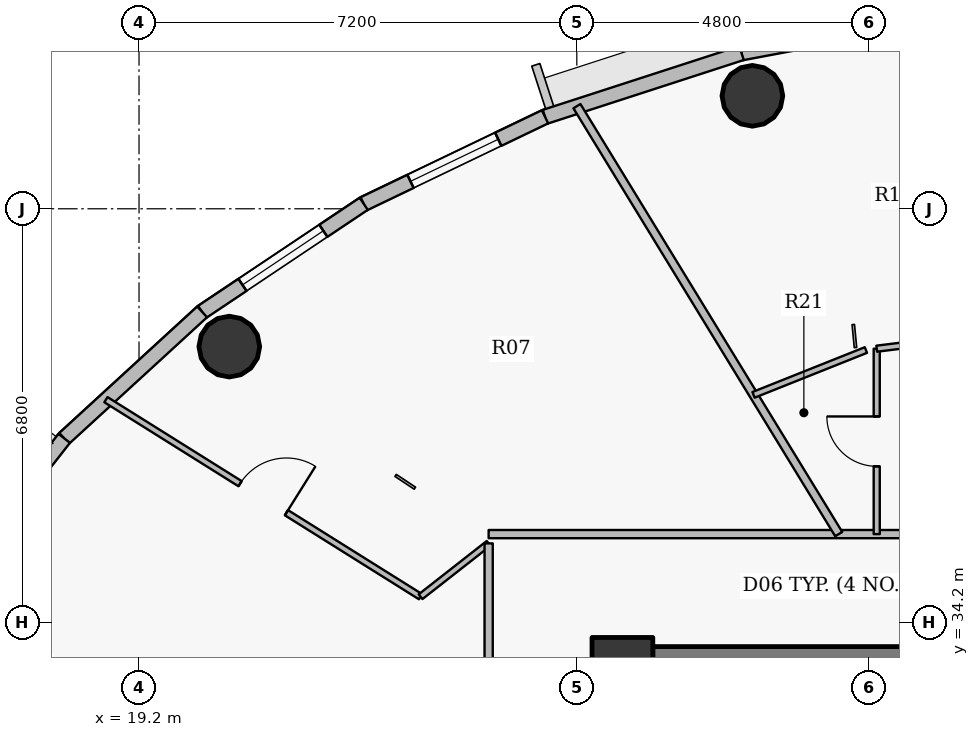
"""IFC4 building model, lengths in metres.
Left out: names, types, materials, properties, quantities, classifications, styles, units other than length and angle.
Written with IfcOpenShell. Run it as: python <this file> out.ifc"""

import sys

from ifc_helpers import new_model, si_unit, direction, frame, frame_2d, origin, origin_2d, place, context, subcontext, project, spatial, rectangle, hollow_circle, extrude, source, transform, mapped, element, fill, save


model = new_model("IFC4")
c1 = context("Model", 3, precision=1e-05, world=origin(), true_north=direction((0.0, 1.0)))
c2 = subcontext(c1, "Body", "Model", "MODEL_VIEW")
j1 = project(units=[si_unit("LENGTHUNIT", "METRE"), si_unit("PLANEANGLEUNIT", "RADIAN")], contexts=[c1])
p1 = place(None, origin())
s1 = spatial("IfcSite", under=j1, at=p1, CompositionType="ELEMENT")
p2 = place(p1, origin())
s2 = spatial("IfcBuilding", under=s1, at=p2, CompositionType="ELEMENT")
p3 = place(p2, frame((0.0, 0.0, 291.75)))
s3 = spatial("IfcBuildingStorey", under=s2, at=p3, CompositionType="ELEMENT", Elevation=291.75)
p4 = place(p3, frame((27.15, 33.45, 0.0), z_axis=(0.0, 0.0, 1.0), x_axis=(1.0, 0.0, 0.0)))
e1 = element("IfcColumn", 1, at=p4, inside=s3, PredefinedType="COLUMN", context=c2, shape_type="SweptSolid", body=[
    extrude(rectangle(XDim=1.0, YDim=1.0, at=origin_2d()), origin(), (0.0, 0.0, 1.0), 3.75),
])
p5 = place(p3, frame((27.65, 33.45, 0.0), z_axis=(0.0, 0.0, 1.0), x_axis=(1.0, 0.0, 0.0)))
e2 = element("IfcWall", 2, at=p5, inside=s3, PredefinedType="SHEAR", context=c2, shape_type="SweptSolid", body=[
    extrude(rectangle(XDim=16.7, YDim=0.7, at=frame_2d((8.35, 0.0))), origin(), (0.0, 0.0, 1.0), 3.05),
])
p6 = place(p5, frame((12.775, 0.0, 0.0)))
e3 = element("IfcOpeningElement", 3, at=p6, cuts=e2, PredefinedType="OPENING", context=c2, shape_type="SweptSolid", body=[
    extrude(rectangle(XDim=1.15, YDim=2.15, at=origin_2d()), frame((0.575, 0.36, 1.075), z_axis=(0.0, -1.0, 0.0), x_axis=(1.0, 0.0, 0.0)), (0.0, 0.0, 1.0), 0.72),
])
for number, where, z_axis, x_axis in (
    (4, (29.288, 42.858, 0.0), (0.0, 0.0, 1.0), (1.0, 0.0, 0.0)),
    (5, (20.685, 38.733, 0.0), (0.0, 0.0, 1.0), (1.0, 0.0, 0.0)),
):
    element("IfcColumn", number, at=place(p3, frame(where, z_axis=z_axis, x_axis=x_axis)), inside=s3, PredefinedType="COLUMN", context=c2, shape_type="SweptSolid", body=[
        extrude(hollow_circle(Radius=0.5, WallThickness=0.032, at=origin_2d()), origin(), (0.0, 0.0, 1.0), 3.75),
    ])
p7 = place(p3, frame((29.109, 43.56, 0.0), z_axis=(0.0, 0.0, 1.0), x_axis=(0.982782655757, 0.184765395959, 0.0)))
e6 = element("IfcWall", 6, at=p7, inside=s3, PredefinedType="SOLIDWALL", context=c2, shape_type="SweptSolid", body=[
    extrude(rectangle(XDim=3.462, YDim=0.24, at=frame_2d((1.731, 0.0))), origin(), (0.0, 0.0, 1.0), 3.5),
])
p8 = place(p7, frame((1.106, 0.0, 0.9)))
e7 = element("IfcOpeningElement", 7, at=p8, cuts=e6, PredefinedType="OPENING", context=c2, shape_type="SweptSolid", body=[
    extrude(rectangle(XDim=1.25, YDim=1.65, at=origin_2d()), frame((0.625, 0.13, 0.825), z_axis=(0.0, -1.0, 0.0), x_axis=(1.0, 0.0, 0.0)), (0.0, 0.0, 1.0), 0.26),
])
p9 = place(p3, frame((25.877, 42.512, 0.0), z_axis=(0.0, 0.0, 1.0), x_axis=(0.95123136723, 0.308478339592, 0.0)))
e8 = element("IfcWall", 8, at=p9, inside=s3, PredefinedType="SOLIDWALL", context=c2, shape_type="SweptSolid", body=[
    extrude(rectangle(XDim=3.398, YDim=0.24, at=frame_2d((1.699, 0.0))), origin(), (0.0, 0.0, 1.0), 3.5),
])
p10 = place(p3, frame((22.896, 41.082, 0.0), z_axis=(0.0, 0.0, 1.0), x_axis=(0.901573741254, 0.43262546051, 0.0)))
e9 = element("IfcWall", 9, at=p10, inside=s3, PredefinedType="SOLIDWALL", context=c2, shape_type="SweptSolid", body=[
    extrude(rectangle(XDim=3.307, YDim=0.24, at=frame_2d((1.653, 0.0))), origin(), (0.0, 0.0, 1.0), 3.5),
])
p11 = place(p10, frame((0.854, 0.0, 0.9)))
e10 = element("IfcOpeningElement", 10, at=p11, cuts=e9, PredefinedType="OPENING", context=c2, shape_type="SweptSolid", body=[
    extrude(rectangle(XDim=1.6, YDim=1.75, at=origin_2d()), frame((0.8, 0.13, 0.875), z_axis=(0.0, -1.0, 0.0), x_axis=(1.0, 0.0, 0.0)), (0.0, 0.0, 1.0), 0.26),
])
p12 = place(p3, frame((20.238, 39.304, 0.0), z_axis=(0.0, 0.0, 1.0), x_axis=(0.831250592635, 0.55589787933, 0.0)))
e11 = element("IfcWall", 11, at=p12, inside=s3, PredefinedType="SOLIDWALL", context=c2, shape_type="SweptSolid", body=[
    extrude(rectangle(XDim=3.197, YDim=0.24, at=frame_2d((1.599, 0.0))), origin(), (0.0, 0.0, 1.0), 3.5),
])
p13 = place(p12, frame((0.799, 0.0, 0.9)))
e12 = element("IfcOpeningElement", 12, at=p13, cuts=e11, PredefinedType="OPENING", context=c2, shape_type="SweptSolid", body=[
    extrude(rectangle(XDim=1.6, YDim=1.75, at=origin_2d()), frame((0.8, 0.13, 0.875), z_axis=(0.0, -1.0, 0.0), x_axis=(1.0, 0.0, 0.0)), (0.0, 0.0, 1.0), 0.26),
])
p14 = place(p3, frame((17.97, 37.225, 0.0), z_axis=(0.0, 0.0, 1.0), x_axis=(0.737068506972, 0.675818034703, 0.0)))
e13 = element("IfcWall", 13, at=p14, inside=s3, PredefinedType="SOLIDWALL", context=c2, shape_type="SweptSolid", body=[
    extrude(rectangle(XDim=3.077, YDim=0.24, at=frame_2d((1.539, 0.0))), origin(), (0.0, 0.0, 1.0), 3.5),
])
p15 = place(p3, frame((16.146, 34.895, 0.0), z_axis=(0.0, 0.0, 1.0), x_axis=(0.616337186556, 0.787482363275, 0.0)))
e14 = element("IfcWall", 14, at=p15, inside=s3, PredefinedType="SOLIDWALL", context=c2, shape_type="SweptSolid", body=[
    extrude(rectangle(XDim=2.958, YDim=0.24, at=frame_2d((1.479, 0.0))), origin(), (0.0, 0.0, 1.0), 3.5),
])
p16 = place(p15, frame((0.954, 0.0, 0.0)))
e15 = element("IfcOpeningElement", 15, at=p16, cuts=e14, PredefinedType="OPENING", context=c2, shape_type="SweptSolid", body=[
    extrude(rectangle(XDim=1.05, YDim=2.15, at=origin_2d()), frame((0.525, 0.13, 1.075), z_axis=(0.0, -1.0, 0.0), x_axis=(1.0, 0.0, 0.0)), (0.0, 0.0, 1.0), 0.26),
])
p17 = place(p3, frame((18.656, 37.861, 0.0), z_axis=(0.0, 0.0, 1.0), x_axis=(0.847553170054, -0.530710489751, 0.0)))
e16 = element("IfcWall", 16, at=p17, inside=s3, PredefinedType="PARTITIONING", context=c2, shape_type="SweptSolid", body=[
    extrude(rectangle(XDim=6.105, YDim=0.1, at=frame_2d((3.052, 0.0))), origin(), (0.0, 0.0, 1.0), 2.985),
])
p18 = place(p17, frame((2.603, 0.0, 0.0)))
e17 = element("IfcOpeningElement", 17, at=p18, cuts=e16, PredefinedType="OPENING", context=c2, shape_type="SweptSolid", body=[
    extrude(rectangle(XDim=0.9, YDim=2.1, at=origin_2d()), frame((0.45, 0.06, 1.05), z_axis=(0.0, -1.0, 0.0), x_axis=(1.0, 0.0, 0.0)), (0.0, 0.0, 1.0), 0.12),
])
p19 = place(p3, frame((23.83, 34.621, 0.0), z_axis=(0.0, 0.0, 1.0), x_axis=(0.787407186809, 0.616433226037, 0.0)))
e18 = element("IfcWall", 18, at=p19, inside=s3, PredefinedType="PARTITIONING", context=c2, shape_type="SweptSolid", body=[
    extrude(rectangle(XDim=1.422, YDim=0.1, at=frame_2d((0.711, 0.0))), origin(), (0.0, 0.0, 1.0), 3.035),
])
p20 = place(p3, frame((24.95, 31.65, 0.0), z_axis=(0.0, 0.0, 1.0), x_axis=(0.0, 1.0, 0.0)))
e19 = element("IfcWall", 19, at=p20, inside=s3, PredefinedType="PARTITIONING", context=c2, shape_type="SweptSolid", body=[
    extrude(rectangle(XDim=3.847, YDim=0.135, at=frame_2d((1.924, 0.0))), origin(), (0.0, 0.0, 1.0), 3.035),
])
p21 = place(p3, frame((24.95, 35.65, 0.0), z_axis=(0.0, 0.0, 1.0), x_axis=(1.0, 0.0, 0.0)))
e20 = element("IfcWall", 20, at=p21, inside=s3, PredefinedType="PARTITIONING", context=c2, shape_type="SweptSolid", body=[
    extrude(rectangle(XDim=10.1, YDim=0.135, at=frame_2d((5.05, 0.0))), origin(), (0.0, 0.0, 1.0), 3.035),
])
p22 = place(p3, frame((26.402, 42.688, 0.0), z_axis=(0.0, 0.0, 1.0), x_axis=(0.521891606098, -0.853011812043, 0.0)))
e21 = element("IfcWall", 21, at=p22, inside=s3, PredefinedType="PARTITIONING", context=c2, shape_type="SweptSolid", body=[
    extrude(rectangle(XDim=8.25, YDim=0.135, at=frame_2d((4.125, 0.0))), origin(), (0.0, 0.0, 1.0), 2.985),
])
p23 = place(p3, frame((29.307, 37.94, 0.0), z_axis=(0.0, 0.0, 1.0), x_axis=(0.928797929692, 0.370586569913, 0.0)))
e22 = element("IfcWall", 22, at=p23, inside=s3, PredefinedType="PARTITIONING", context=c2, shape_type="SweptSolid", body=[
    extrude(rectangle(XDim=1.99, YDim=0.1, at=frame_2d((0.995, 0.0))), origin(), (0.0, 0.0, 1.0), 3.035),
])
p24 = place(p3, frame((31.333, 35.65, 0.0), z_axis=(0.0, 0.0, 1.0), x_axis=(0.0, 1.0, 0.0)))
e23 = element("IfcWall", 23, at=p24, inside=s3, PredefinedType="PARTITIONING", context=c2, shape_type="SweptSolid", body=[
    extrude(rectangle(XDim=3.049, YDim=0.1, at=frame_2d((1.525, 0.0))), origin(), (0.0, 0.0, 1.0), 3.035),
])
p25 = place(p24, frame((1.115, 0.0, 0.0)))
e24 = element("IfcOpeningElement", 24, at=p25, cuts=e23, PredefinedType="OPENING", context=c2, shape_type="SweptSolid", body=[
    extrude(rectangle(XDim=0.82, YDim=2.1, at=origin_2d()), frame((0.41, 0.06, 1.05), z_axis=(0.0, -1.0, 0.0), x_axis=(1.0, 0.0, 0.0)), (0.0, 0.0, 1.0), 0.12),
])
p26 = place(p3, frame((31.333, 38.699, 0.0), z_axis=(0.0, 0.0, 1.0), x_axis=(0.992398193069, 0.123068380965, 0.0)))
e25 = element("IfcWall", 25, at=p26, inside=s3, PredefinedType="PARTITIONING", context=c2, shape_type="SweptSolid", body=[
    extrude(rectangle(XDim=3.638, YDim=0.1, at=frame_2d((1.819, 0.0))), origin(), (0.0, 0.0, 1.0), 3.185),
])
p27 = place(p3, frame((27.64, 33.8, 0.0), z_axis=(0.0, 0.0, 1.0), x_axis=(-1.0, 0.0, 0.0)))
e26 = element("IfcWall", 26, at=p27, inside=s3, PredefinedType="PARTITIONING", context=c2, shape_type="SweptSolid", body=[
    extrude(rectangle(XDim=0.84, YDim=0.135, at=frame_2d((0.42, 0.0))), origin(), (0.0, 0.0, 1.0), 3.035),
])
m1 = source(origin(), c2, "Body", "SweptSolid", [
    extrude(rectangle(XDim=1.6, YDim=1.75, at=origin_2d()), frame((0.8, 0.03, 0.875), z_axis=(0.0, -1.0, 0.0), x_axis=(1.0, 0.0, 0.0)), (0.0, 0.0, 1.0), 0.06),
])
p28 = place(p11, origin())
e27 = element("IfcWindow", 27, at=p28, inside=s3, PartitioningType="DOUBLE_PANEL_VERTICAL", PredefinedType="WINDOW", context=c2, shape_type="MappedRepresentation", body=[
    mapped(m1, transform((0.0, 0.0, 0.0), x_axis=(1.0, 0.0, 0.0), y_axis=(0.0, 1.0, 0.0), z_axis=(0.0, 0.0, 1.0), scale=1.0)),
])
fill(e10, e27)
p29 = place(p13, origin())
e28 = element("IfcWindow", 28, at=p29, inside=s3, PartitioningType="DOUBLE_PANEL_VERTICAL", PredefinedType="WINDOW", context=c2, shape_type="MappedRepresentation", body=[
    mapped(m1, transform((0.0, 0.0, 0.0), x_axis=(1.0, 0.0, 0.0), y_axis=(0.0, 1.0, 0.0), z_axis=(0.0, 0.0, 1.0), scale=1.0)),
])
fill(e12, e28)
m2 = source(origin(), c2, "Body", "SweptSolid", [
    extrude(rectangle(XDim=0.82, YDim=2.1, at=origin_2d()), frame((0.41, 0.025, 1.05), z_axis=(0.0, -1.0, 0.0), x_axis=(1.0, 0.0, 0.0)), (0.0, 0.0, 1.0), 0.05),
])
p30 = place(p25, origin())
e29 = element("IfcDoor", 29, at=p30, inside=s3, OperationType="SINGLE_SWING_RIGHT", PredefinedType="DOOR", context=c2, shape_type="MappedRepresentation", body=[
    mapped(m2, transform((0.0, 0.0, 0.0), x_axis=(1.0, 0.0, 0.0), y_axis=(0.0, 1.0, 0.0), z_axis=(0.0, 0.0, 1.0), scale=1.0)),
])
fill(e24, e29)
m3 = source(origin(), c2, "Body", "SweptSolid", [
    extrude(rectangle(XDim=0.9, YDim=2.1, at=origin_2d()), frame((0.45, 0.025, 1.05), z_axis=(0.0, -1.0, 0.0), x_axis=(1.0, 0.0, 0.0)), (0.0, 0.0, 1.0), 0.05),
])
p31 = place(p18, origin())
e30 = element("IfcDoor", 30, at=p31, inside=s3, OperationType="SINGLE_SWING_RIGHT", PredefinedType="DOOR", context=c2, shape_type="MappedRepresentation", body=[
    mapped(m3, transform((0.0, 0.0, 0.0), x_axis=(1.0, 0.0, 0.0), y_axis=(0.0, 1.0, 0.0), z_axis=(0.0, 0.0, 1.0), scale=1.0)),
])
fill(e17, e30)
save(model, sys.argv[1])
